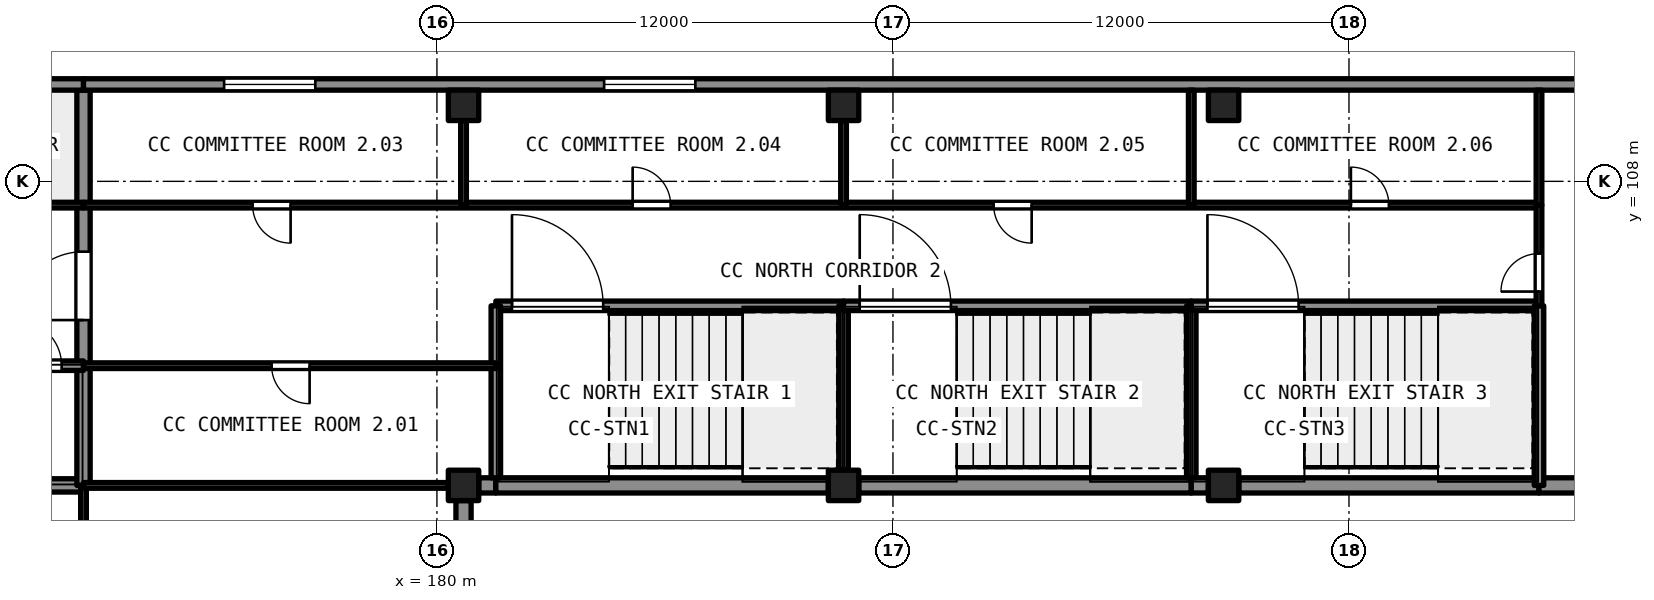
"""IFC4 building model, lengths in metres.
Left out: names, types, materials, properties, quantities, classifications, styles, units other than length and angle.
Written with IfcOpenShell. Run it as: python <this file> out.ifc"""

import sys

from ifc_helpers import new_model, si_unit, direction, frame, frame_2d, origin, origin_2d, place, context, subcontext, project, spatial, rectangle, extrude, element, fill, save


model = new_model("IFC4")
c1 = context("Model", 3, precision=1e-05, world=origin(), true_north=direction((0.0, 1.0)))
c2 = subcontext(c1, "Body", "Model", "MODEL_VIEW")
j1 = project(units=[si_unit("LENGTHUNIT", "METRE"), si_unit("PLANEANGLEUNIT", "RADIAN")], contexts=[c1])
p1 = place(None, origin())
s1 = spatial("IfcSite", under=j1, at=p1, CompositionType="ELEMENT")
p2 = place(p1, origin())
s2 = spatial("IfcBuilding", under=s1, at=p2, CompositionType="ELEMENT")
p3 = place(p2, frame((0.0, 0.0, 15.0)))
s3 = spatial("IfcBuildingStorey", under=s2, at=p3, CompositionType="ELEMENT", Elevation=15.0)
for number, where, z_axis, x_axis in (
    (1, (180.7, 100.0, 0.0), (0.0, 0.0, 1.0), (1.0, 0.0, 0.0)),
    (2, (180.7, 110.0, 0.0), (0.0, 0.0, 1.0), (1.0, 0.0, 0.0)),
    (3, (190.7, 100.0, 0.0), (0.0, 0.0, 1.0), (1.0, 0.0, 0.0)),
    (4, (190.7, 110.0, 0.0), (0.0, 0.0, 1.0), (1.0, 0.0, 0.0)),
    (5, (200.7, 100.0, 0.0), (0.0, 0.0, 1.0), (1.0, 0.0, 0.0)),
    (6, (200.7, 110.0, 0.0), (0.0, 0.0, 1.0), (1.0, 0.0, 0.0)),
):
    element("IfcColumn", number, at=place(p3, frame(where, z_axis=z_axis, x_axis=x_axis)), inside=s3, PredefinedType="COLUMN", context=c2, shape_type="SweptSolid", body=[
        extrude(rectangle(XDim=0.8, YDim=0.8, at=origin_2d()), origin(), (0.0, 0.0, 1.0), 5.4),
    ])
p4 = place(p3, frame((180.7, 60.4, 0.0), z_axis=(0.0, 0.0, 1.0), x_axis=(0.0, 1.0, 0.0)))
e7 = element("IfcWall", 7, at=p4, inside=s3, PredefinedType="SHEAR", context=c2, shape_type="SweptSolid", body=[
    extrude(rectangle(XDim=39.2, YDim=0.4, at=frame_2d((19.6, 0.0))), origin(), (0.0, 0.0, 1.0), 5.4),
])
p5 = place(p4, frame((8.3, 0.0, 0.0)))
e8 = element("IfcOpeningElement", 8, at=p5, cuts=e7, PredefinedType="OPENING", context=c2, shape_type="SweptSolid", body=[
    extrude(rectangle(XDim=2.4, YDim=2.4, at=frame_2d((1.2, 1.2))), frame((0.0, 0.21, 0.0), z_axis=(0.0, -1.0, 0.0), x_axis=(1.0, 0.0, 0.0)), (0.0, 0.0, 1.0), 0.421),
])
p6 = place(p4, frame((28.3, 0.0, 0.0)))
e9 = element("IfcOpeningElement", 9, at=p6, cuts=e7, PredefinedType="OPENING", context=c2, shape_type="SweptSolid", body=[
    extrude(rectangle(XDim=2.4, YDim=2.4, at=frame_2d((1.2, 1.2))), frame((0.0, 0.21, 0.0), z_axis=(0.0, -1.0, 0.0), x_axis=(1.0, 0.0, 0.0)), (0.0, 0.0, 1.0), 0.421),
])
p7 = place(p3, frame((181.1, 100.0, 0.0), z_axis=(0.0, 0.0, 1.0), x_axis=(1.0, 0.0, 0.0)))
e10 = element("IfcWall", 10, at=p7, inside=s3, PredefinedType="SHEAR", context=c2, shape_type="SweptSolid", body=[
    extrude(rectangle(XDim=0.45, YDim=0.4, at=frame_2d((0.225, 0.0))), origin(), (0.0, 0.0, 1.0), 5.4),
])
for number, where, z_axis, x_axis in (
    (11, (181.55, 100.0, 0.0), (0.0, 0.0, 1.0), (1.0, 0.0, 0.0)),
    (12, (191.1, 100.0, 0.0), (0.0, 0.0, 1.0), (1.0, 0.0, 0.0)),
):
    element("IfcWall", number, at=place(p3, frame(where, z_axis=z_axis, x_axis=x_axis)), inside=s3, PredefinedType="SHEAR", context=c2, shape_type="SweptSolid", body=[
        extrude(rectangle(XDim=8.75, YDim=0.4, at=frame_2d((4.375, 0.0))), origin(), (0.0, 0.0, 1.0), 5.4),
    ])
p8 = place(p3, frame((199.85, 100.0, 0.0), z_axis=(0.0, 0.0, 1.0), x_axis=(1.0, 0.0, 0.0)))
e13 = element("IfcWall", 13, at=p8, inside=s3, PredefinedType="SHEAR", context=c2, shape_type="SweptSolid", body=[
    extrude(rectangle(XDim=0.45, YDim=0.4, at=frame_2d((0.225, 0.0))), origin(), (0.0, 0.0, 1.0), 5.4),
])
p9 = place(p3, frame((201.1, 100.0, 0.0), z_axis=(0.0, 0.0, 1.0), x_axis=(1.0, 0.0, 0.0)))
e14 = element("IfcWall", 14, at=p9, inside=s3, PredefinedType="SHEAR", context=c2, shape_type="SweptSolid", body=[
    extrude(rectangle(XDim=7.9, YDim=0.4, at=frame_2d((3.95, 0.0))), origin(), (0.0, 0.0, 1.0), 5.4),
])
p10 = place(p3, frame((209.0, 100.0, 0.0), z_axis=(0.0, 0.0, 1.0), x_axis=(1.0, 0.0, 0.0)))
e15 = element("IfcWall", 15, at=p10, inside=s3, PredefinedType="SHEAR", context=c2, shape_type="SweptSolid", body=[
    extrude(rectangle(XDim=1.3, YDim=0.4, at=frame_2d((0.65, 0.0))), origin(), (0.0, 0.0, 1.0), 5.4),
])
p11 = place(p3, frame((163.0, 100.0, 0.0), z_axis=(0.0, 0.0, 1.0), x_axis=(1.0, 0.0, 0.0)))
e16 = element("IfcWall", 16, at=p11, inside=s3, PredefinedType="SHEAR", context=c2, shape_type="SweptSolid", body=[
    extrude(rectangle(XDim=7.7, YDim=0.35, at=frame_2d((3.85, 0.0))), origin(), (0.0, 0.0, 1.0), 4.99),
])
p12 = place(p3, frame((170.7, 100.0, 0.0), z_axis=(0.0, 0.0, 1.0), x_axis=(0.0, 1.0, 0.0)))
e17 = element("IfcWall", 17, at=p12, inside=s3, PredefinedType="SHEAR", context=c2, shape_type="SweptSolid", body=[
    extrude(rectangle(XDim=3.15, YDim=0.35, at=frame_2d((1.575, 0.0))), origin(), (0.0, 0.0, 1.0), 4.99),
])
p13 = place(p3, frame((170.7, 103.15, 0.0), z_axis=(0.0, 0.0, 1.0), x_axis=(0.0, 1.0, 0.0)))
e18 = element("IfcWall", 18, at=p13, inside=s3, PredefinedType="SHEAR", context=c2, shape_type="SweptSolid", body=[
    extrude(rectangle(XDim=7.25, YDim=0.35, at=frame_2d((3.625, 0.0))), origin(), (0.0, 0.0, 1.0), 4.99),
])
p14 = place(p13, frame((1.2, 0.0, 0.0)))
e19 = element("IfcOpeningElement", 19, at=p14, cuts=e18, PredefinedType="OPENING", context=c2, shape_type="SweptSolid", body=[
    extrude(rectangle(XDim=1.8, YDim=2.1, at=frame_2d((0.9, 1.05))), frame((0.0, 0.186, 0.0), z_axis=(0.0, -1.0, 0.0), x_axis=(1.0, 0.0, 0.0)), (0.0, 0.0, 1.0), 0.371),
])
p15 = place(p3, frame((163.0, 103.15, 0.0), z_axis=(0.0, 0.0, 1.0), x_axis=(1.0, 0.0, 0.0)))
e20 = element("IfcWall", 20, at=p15, inside=s3, PredefinedType="SHEAR", context=c2, shape_type="SweptSolid", body=[
    extrude(rectangle(XDim=7.7, YDim=0.25, at=frame_2d((3.85, 0.0))), origin(), (0.0, 0.0, 1.0), 4.99),
])
p16 = place(p15, frame((5.925, 0.0, 0.0)))
e21 = element("IfcOpeningElement", 21, at=p16, cuts=e20, PredefinedType="OPENING", context=c2, shape_type="SweptSolid", body=[
    extrude(rectangle(XDim=1.2, YDim=2.1, at=frame_2d((0.6, 1.05))), frame((0.0, 0.135, 0.0), z_axis=(0.0, -1.0, 0.0), x_axis=(1.0, 0.0, 0.0)), (0.0, 0.0, 1.0), 0.271),
])
p17 = place(p3, frame((163.875, 107.375, 0.0), z_axis=(0.0, 0.0, 1.0), x_axis=(1.0, 0.0, 0.0)))
e22 = element("IfcWall", 22, at=p17, inside=s3, PredefinedType="PARTITIONING", context=c2, shape_type="SweptSolid", body=[
    extrude(rectangle(XDim=6.825, YDim=0.15, at=frame_2d((3.413, 0.0))), origin(), (0.0, 0.0, 1.0), 4.99),
])
p18 = place(p17, frame((2.95, 0.0, 0.0)))
e23 = element("IfcOpeningElement", 23, at=p18, cuts=e22, PredefinedType="OPENING", context=c2, shape_type="SweptSolid", body=[
    extrude(rectangle(XDim=0.9, YDim=2.1, at=frame_2d((0.45, 1.05))), frame((0.0, 0.085, 0.0), z_axis=(0.0, -1.0, 0.0), x_axis=(1.0, 0.0, 0.0)), (0.0, 0.0, 1.0), 0.171),
])
p19 = place(p3, frame((163.875, 110.55, 0.0), z_axis=(0.0, 0.0, 1.0), x_axis=(1.0, 0.0, 0.0)))
e24 = element("IfcWall", 24, at=p19, inside=s3, PredefinedType="SOLIDWALL", context=c2, shape_type="SweptSolid", body=[
    extrude(rectangle(XDim=6.825, YDim=0.3, at=frame_2d((3.413, 0.0))), origin(), (0.0, 0.0, 1.0), 4.99),
])
p20 = place(p3, frame((170.7, 110.55, 0.0), z_axis=(0.0, 0.0, 1.0), x_axis=(1.0, 0.0, 0.0)))
e25 = element("IfcWall", 25, at=p20, inside=s3, PredefinedType="SOLIDWALL", context=c2, shape_type="SweptSolid", body=[
    extrude(rectangle(XDim=50.0, YDim=0.3, at=frame_2d((25.0, 0.0))), origin(), (0.0, 0.0, 1.0), 4.99),
])
p21 = place(p20, frame((3.7, 0.0, 0.9)))
e26 = element("IfcOpeningElement", 26, at=p21, cuts=e25, PredefinedType="OPENING", context=c2, shape_type="SweptSolid", body=[
    extrude(rectangle(XDim=2.4, YDim=1.8, at=frame_2d((1.2, 0.9))), frame((0.0, 0.161, 0.0), z_axis=(0.0, -1.0, 0.0), x_axis=(1.0, 0.0, 0.0)), (0.0, 0.0, 1.0), 0.321),
])
p22 = place(p20, frame((13.7, 0.0, 0.9)))
e27 = element("IfcOpeningElement", 27, at=p22, cuts=e25, PredefinedType="OPENING", context=c2, shape_type="SweptSolid", body=[
    extrude(rectangle(XDim=2.4, YDim=1.8, at=frame_2d((1.2, 0.9))), frame((0.0, 0.161, 0.0), z_axis=(0.0, -1.0, 0.0), x_axis=(1.0, 0.0, 0.0)), (0.0, 0.0, 1.0), 0.321),
])
p23 = place(p3, frame((170.7, 90.0, 0.0), z_axis=(0.0, 0.0, 1.0), x_axis=(0.0, 1.0, 0.0)))
e28 = element("IfcWall", 28, at=p23, inside=s3, PredefinedType="PARTITIONING", context=c2, shape_type="SweptSolid", body=[
    extrude(rectangle(XDim=10.0, YDim=0.15, at=frame_2d((5.0, 0.0))), origin(), (0.0, 0.0, 1.0), 4.99),
])
p24 = place(p3, frame((170.7, 100.0, 0.0), z_axis=(0.0, 0.0, 1.0), x_axis=(1.0, 0.0, 0.0)))
e29 = element("IfcWall", 29, at=p24, inside=s3, PredefinedType="PARTITIONING", context=c2, shape_type="SweptSolid", body=[
    extrude(rectangle(XDim=9.6, YDim=0.15, at=frame_2d((4.8, 0.0))), origin(), (0.0, 0.0, 1.0), 4.99),
])
p25 = place(p3, frame((181.55, 104.725, 0.0), z_axis=(0.0, 0.0, 1.0), x_axis=(1.0, 0.0, 0.0)))
e30 = element("IfcWall", 30, at=p25, inside=s3, PredefinedType="SHEAR", context=c2, shape_type="SweptSolid", body=[
    extrude(rectangle(XDim=9.15, YDim=0.25, at=frame_2d((4.575, 0.0))), origin(), (0.0, 0.0, 1.0), 4.99),
])
p26 = place(p25, frame((0.425, 0.0, 0.0)))
e31 = element("IfcOpeningElement", 31, at=p26, cuts=e30, PredefinedType="OPENING", context=c2, shape_type="SweptSolid", body=[
    extrude(rectangle(XDim=2.4, YDim=2.1, at=frame_2d((1.2, 1.05))), frame((0.0, 0.135, 0.0), z_axis=(0.0, -1.0, 0.0), x_axis=(1.0, 0.0, 0.0)), (0.0, 0.0, 1.0), 0.271),
])
p27 = place(p3, frame((181.55, 100.2, 0.0), z_axis=(0.0, 0.0, 1.0), x_axis=(0.0, 1.0, 0.0)))
e32 = element("IfcWall", 32, at=p27, inside=s3, PredefinedType="SHEAR", context=c2, shape_type="SweptSolid", body=[
    extrude(rectangle(XDim=4.525, YDim=0.25, at=frame_2d((2.263, 0.0))), origin(), (0.0, 0.0, 1.0), 4.99),
])
p28 = place(p3, frame((190.7, 100.4, 0.0), z_axis=(0.0, 0.0, 1.0), x_axis=(0.0, 1.0, 0.0)))
e33 = element("IfcWall", 33, at=p28, inside=s3, PredefinedType="SHEAR", context=c2, shape_type="SweptSolid", body=[
    extrude(rectangle(XDim=4.325, YDim=0.25, at=frame_2d((2.163, 0.0))), origin(), (0.0, 0.0, 1.0), 4.99),
])
p29 = place(p3, frame((190.7, 104.725, 0.0), z_axis=(0.0, 0.0, 1.0), x_axis=(1.0, 0.0, 0.0)))
e34 = element("IfcWall", 34, at=p29, inside=s3, PredefinedType="SHEAR", context=c2, shape_type="SweptSolid", body=[
    extrude(rectangle(XDim=9.15, YDim=0.25, at=frame_2d((4.575, 0.0))), origin(), (0.0, 0.0, 1.0), 4.99),
])
p30 = place(p29, frame((0.425, 0.0, 0.0)))
e35 = element("IfcOpeningElement", 35, at=p30, cuts=e34, PredefinedType="OPENING", context=c2, shape_type="SweptSolid", body=[
    extrude(rectangle(XDim=2.4, YDim=2.1, at=frame_2d((1.2, 1.05))), frame((0.0, 0.135, 0.0), z_axis=(0.0, -1.0, 0.0), x_axis=(1.0, 0.0, 0.0)), (0.0, 0.0, 1.0), 0.271),
])
p31 = place(p3, frame((199.85, 100.2, 0.0), z_axis=(0.0, 0.0, 1.0), x_axis=(0.0, 1.0, 0.0)))
e36 = element("IfcWall", 36, at=p31, inside=s3, PredefinedType="SHEAR", context=c2, shape_type="SweptSolid", body=[
    extrude(rectangle(XDim=4.525, YDim=0.25, at=frame_2d((2.263, 0.0))), origin(), (0.0, 0.0, 1.0), 4.99),
])
p32 = place(p3, frame((199.85, 104.725, 0.0), z_axis=(0.0, 0.0, 1.0), x_axis=(1.0, 0.0, 0.0)))
e37 = element("IfcWall", 37, at=p32, inside=s3, PredefinedType="SHEAR", context=c2, shape_type="SweptSolid", body=[
    extrude(rectangle(XDim=9.15, YDim=0.25, at=frame_2d((4.575, 0.0))), origin(), (0.0, 0.0, 1.0), 4.99),
])
p33 = place(p32, frame((0.425, 0.0, 0.0)))
e38 = element("IfcOpeningElement", 38, at=p33, cuts=e37, PredefinedType="OPENING", context=c2, shape_type="SweptSolid", body=[
    extrude(rectangle(XDim=2.4, YDim=2.1, at=frame_2d((1.2, 1.05))), frame((0.0, 0.135, 0.0), z_axis=(0.0, -1.0, 0.0), x_axis=(1.0, 0.0, 0.0)), (0.0, 0.0, 1.0), 0.271),
])
p34 = place(p3, frame((209.0, 100.0, 0.0), z_axis=(0.0, 0.0, 1.0), x_axis=(0.0, 1.0, 0.0)))
e39 = element("IfcWall", 39, at=p34, inside=s3, PredefinedType="SHEAR", context=c2, shape_type="SweptSolid", body=[
    extrude(rectangle(XDim=4.725, YDim=0.25, at=frame_2d((2.363, 0.0))), origin(), (0.0, 0.0, 1.0), 4.99),
])
p35 = place(p3, frame((170.7, 103.15, 0.0), z_axis=(0.0, 0.0, 1.0), x_axis=(1.0, 0.0, 0.0)))
e40 = element("IfcWall", 40, at=p35, inside=s3, PredefinedType="PARTITIONING", context=c2, shape_type="SweptSolid", body=[
    extrude(rectangle(XDim=10.85, YDim=0.15, at=frame_2d((5.425, 0.0))), origin(), (0.0, 0.0, 1.0), 4.99),
])
p36 = place(p35, frame((4.95, 0.0, 0.0)))
e41 = element("IfcOpeningElement", 41, at=p36, cuts=e40, PredefinedType="OPENING", context=c2, shape_type="SweptSolid", body=[
    extrude(rectangle(XDim=1.0, YDim=2.1, at=frame_2d((0.5, 1.05))), frame((0.0, 0.085, 0.0), z_axis=(0.0, -1.0, 0.0), x_axis=(1.0, 0.0, 0.0)), (0.0, 0.0, 1.0), 0.171),
])
p37 = place(p3, frame((209.0, 107.375, 0.0), z_axis=(0.0, 0.0, 1.0), x_axis=(-1.0, 0.0, 0.0)))
e42 = element("IfcWall", 42, at=p37, inside=s3, PredefinedType="PARTITIONING", context=c2, shape_type="SweptSolid", body=[
    extrude(rectangle(XDim=38.3, YDim=0.15, at=frame_2d((19.15, 0.0))), origin(), (0.0, 0.0, 1.0), 4.99),
])
p38 = place(p37, frame((32.85, 0.0, 0.0)))
e43 = element("IfcOpeningElement", 43, at=p38, cuts=e42, PredefinedType="OPENING", context=c2, shape_type="SweptSolid", body=[
    extrude(rectangle(XDim=1.0, YDim=2.1, at=frame_2d((0.5, 1.05))), frame((0.0, 0.085, 0.0), z_axis=(0.0, -1.0, 0.0), x_axis=(1.0, 0.0, 0.0)), (0.0, 0.0, 1.0), 0.171),
])
p39 = place(p37, frame((22.85, 0.0, 0.0)))
e44 = element("IfcOpeningElement", 44, at=p39, cuts=e42, PredefinedType="OPENING", context=c2, shape_type="SweptSolid", body=[
    extrude(rectangle(XDim=1.0, YDim=2.1, at=frame_2d((0.5, 1.05))), frame((0.0, 0.085, 0.0), z_axis=(0.0, -1.0, 0.0), x_axis=(1.0, 0.0, 0.0)), (0.0, 0.0, 1.0), 0.171),
])
p40 = place(p37, frame((13.35, 0.0, 0.0)))
e45 = element("IfcOpeningElement", 45, at=p40, cuts=e42, PredefinedType="OPENING", context=c2, shape_type="SweptSolid", body=[
    extrude(rectangle(XDim=1.0, YDim=2.1, at=frame_2d((0.5, 1.05))), frame((0.0, 0.085, 0.0), z_axis=(0.0, -1.0, 0.0), x_axis=(1.0, 0.0, 0.0)), (0.0, 0.0, 1.0), 0.171),
])
p41 = place(p37, frame((3.95, 0.0, 0.0)))
e46 = element("IfcOpeningElement", 46, at=p41, cuts=e42, PredefinedType="OPENING", context=c2, shape_type="SweptSolid", body=[
    extrude(rectangle(XDim=1.0, YDim=2.1, at=frame_2d((0.5, 1.05))), frame((0.0, 0.085, 0.0), z_axis=(0.0, -1.0, 0.0), x_axis=(1.0, 0.0, 0.0)), (0.0, 0.0, 1.0), 0.171),
])
p42 = place(p3, frame((209.0, 104.725, 0.0), z_axis=(0.0, 0.0, 1.0), x_axis=(0.0, 1.0, 0.0)))
e47 = element("IfcWall", 47, at=p42, inside=s3, PredefinedType="PARTITIONING", context=c2, shape_type="SweptSolid", body=[
    extrude(rectangle(XDim=2.65, YDim=0.15, at=frame_2d((1.325, 0.0))), origin(), (0.0, 0.0, 1.0), 4.99),
])
p43 = place(p42, frame((0.375, 0.0, 0.0)))
e48 = element("IfcOpeningElement", 48, at=p43, cuts=e47, PredefinedType="OPENING", context=c2, shape_type="SweptSolid", body=[
    extrude(rectangle(XDim=1.0, YDim=2.1, at=frame_2d((0.5, 1.05))), frame((0.0, 0.085, 0.0), z_axis=(0.0, -1.0, 0.0), x_axis=(1.0, 0.0, 0.0)), (0.0, 0.0, 1.0), 0.171),
])
for number, where, z_axis, x_axis in (
    (49, (180.7, 107.375, 0.0), (0.0, 0.0, 1.0), (0.0, 1.0, 0.0)),
    (50, (190.7, 107.375, 0.0), (0.0, 0.0, 1.0), (0.0, 1.0, 0.0)),
):
    element("IfcWall", number, at=place(p3, frame(where, z_axis=z_axis, x_axis=x_axis)), inside=s3, PredefinedType="PARTITIONING", context=c2, shape_type="SweptSolid", body=[
        extrude(rectangle(XDim=2.225, YDim=0.15, at=frame_2d((1.113, 0.0))), origin(), (0.0, 0.0, 1.0), 4.99),
    ])
for number, where, z_axis, x_axis in (
    (51, (199.85, 107.375, 0.0), (0.0, 0.0, 1.0), (0.0, 1.0, 0.0)),
    (52, (209.0, 107.375, 0.0), (0.0, 0.0, 1.0), (0.0, 1.0, 0.0)),
):
    element("IfcWall", number, at=place(p3, frame(where, z_axis=z_axis, x_axis=x_axis)), inside=s3, PredefinedType="PARTITIONING", context=c2, shape_type="SweptSolid", body=[
        extrude(rectangle(XDim=3.025, YDim=0.15, at=frame_2d((1.512, 0.0))), origin(), (0.0, 0.0, 1.0), 4.99),
    ])
p44 = place(p14, origin())
e53 = element("IfcDoor", 53, at=p44, inside=s3, OperationType="DOUBLE_DOOR_SINGLE_SWING", PredefinedType="DOOR", context=c2, shape_type="SweptSolid", body=[
    extrude(rectangle(XDim=1.8, YDim=2.1, at=frame_2d((0.9, 1.05))), frame((0.0, 0.025, 0.0), z_axis=(0.0, -1.0, 0.0), x_axis=(1.0, 0.0, 0.0)), (0.0, 0.0, 1.0), 0.05),
])
fill(e19, e53)
p45 = place(p36, origin())
e54 = element("IfcDoor", 54, at=p45, inside=s3, OperationType="SINGLE_SWING_RIGHT", PredefinedType="DOOR", context=c2, shape_type="SweptSolid", body=[
    extrude(rectangle(XDim=1.0, YDim=2.1, at=frame_2d((0.5, 1.05))), frame((0.0, 0.025, 0.0), z_axis=(0.0, -1.0, 0.0), x_axis=(1.0, 0.0, 0.0)), (0.0, 0.0, 1.0), 0.05),
])
fill(e41, e54)
p46 = place(p38, origin())
e55 = element("IfcDoor", 55, at=p46, inside=s3, OperationType="SINGLE_SWING_LEFT", PredefinedType="DOOR", context=c2, shape_type="SweptSolid", body=[
    extrude(rectangle(XDim=1.0, YDim=2.1, at=frame_2d((0.5, 1.05))), frame((0.0, 0.025, 0.0), z_axis=(0.0, -1.0, 0.0), x_axis=(1.0, 0.0, 0.0)), (0.0, 0.0, 1.0), 0.05),
])
fill(e43, e55)
p47 = place(p39, origin())
e56 = element("IfcDoor", 56, at=p47, inside=s3, OperationType="SINGLE_SWING_RIGHT", PredefinedType="DOOR", context=c2, shape_type="SweptSolid", body=[
    extrude(rectangle(XDim=1.0, YDim=2.1, at=frame_2d((0.5, 1.05))), frame((0.0, 0.025, 0.0), z_axis=(0.0, -1.0, 0.0), x_axis=(1.0, 0.0, 0.0)), (0.0, 0.0, 1.0), 0.05),
])
fill(e44, e56)
p48 = place(p40, origin())
e57 = element("IfcDoor", 57, at=p48, inside=s3, OperationType="SINGLE_SWING_LEFT", PredefinedType="DOOR", context=c2, shape_type="SweptSolid", body=[
    extrude(rectangle(XDim=1.0, YDim=2.1, at=frame_2d((0.5, 1.05))), frame((0.0, 0.025, 0.0), z_axis=(0.0, -1.0, 0.0), x_axis=(1.0, 0.0, 0.0)), (0.0, 0.0, 1.0), 0.05),
])
fill(e45, e57)
p49 = place(p41, origin())
e58 = element("IfcDoor", 58, at=p49, inside=s3, OperationType="SINGLE_SWING_RIGHT", PredefinedType="DOOR", context=c2, shape_type="SweptSolid", body=[
    extrude(rectangle(XDim=1.0, YDim=2.1, at=frame_2d((0.5, 1.05))), frame((0.0, 0.025, 0.0), z_axis=(0.0, -1.0, 0.0), x_axis=(1.0, 0.0, 0.0)), (0.0, 0.0, 1.0), 0.05),
])
fill(e46, e58)
p50 = place(p43, origin())
e59 = element("IfcDoor", 59, at=p50, inside=s3, OperationType="SINGLE_SWING_LEFT", PredefinedType="DOOR", context=c2, shape_type="SweptSolid", body=[
    extrude(rectangle(XDim=1.0, YDim=2.1, at=frame_2d((0.5, 1.05))), frame((0.0, 0.025, 0.0), z_axis=(0.0, -1.0, 0.0), x_axis=(1.0, 0.0, 0.0)), (0.0, 0.0, 1.0), 0.05),
])
fill(e48, e59)
p51 = place(p16, origin())
e60 = element("IfcDoor", 60, at=p51, inside=s3, OperationType="SINGLE_SWING_LEFT", PredefinedType="DOOR", context=c2, shape_type="SweptSolid", body=[
    extrude(rectangle(XDim=1.2, YDim=2.1, at=frame_2d((0.6, 1.05))), frame((0.0, 0.025, 0.0), z_axis=(0.0, -1.0, 0.0), x_axis=(1.0, 0.0, 0.0)), (0.0, 0.0, 1.0), 0.05),
])
fill(e21, e60)
p52 = place(p26, origin())
e61 = element("IfcDoor", 61, at=p52, inside=s3, OperationType="DOUBLE_DOOR_SINGLE_SWING", PredefinedType="DOOR", context=c2, shape_type="SweptSolid", body=[
    extrude(rectangle(XDim=2.4, YDim=2.1, at=frame_2d((1.2, 1.05))), frame((0.0, 0.025, 0.0), z_axis=(0.0, -1.0, 0.0), x_axis=(1.0, 0.0, 0.0)), (0.0, 0.0, 1.0), 0.05),
])
fill(e31, e61)
p53 = place(p30, origin())
e62 = element("IfcDoor", 62, at=p53, inside=s3, OperationType="DOUBLE_DOOR_SINGLE_SWING", PredefinedType="DOOR", context=c2, shape_type="SweptSolid", body=[
    extrude(rectangle(XDim=2.4, YDim=2.1, at=frame_2d((1.2, 1.05))), frame((0.0, 0.025, 0.0), z_axis=(0.0, -1.0, 0.0), x_axis=(1.0, 0.0, 0.0)), (0.0, 0.0, 1.0), 0.05),
])
fill(e35, e62)
p54 = place(p33, origin())
e63 = element("IfcDoor", 63, at=p54, inside=s3, OperationType="DOUBLE_DOOR_SINGLE_SWING", PredefinedType="DOOR", context=c2, shape_type="SweptSolid", body=[
    extrude(rectangle(XDim=2.4, YDim=2.1, at=frame_2d((1.2, 1.05))), frame((0.0, 0.025, 0.0), z_axis=(0.0, -1.0, 0.0), x_axis=(1.0, 0.0, 0.0)), (0.0, 0.0, 1.0), 0.05),
])
fill(e38, e63)
p55 = place(p21, origin())
e64 = element("IfcWindow", 64, at=p55, inside=s3, PartitioningType="DOUBLE_PANEL_VERTICAL", PredefinedType="WINDOW", context=c2, shape_type="SweptSolid", body=[
    extrude(rectangle(XDim=2.4, YDim=1.8, at=frame_2d((1.2, 0.9))), frame((0.0, 0.03, 0.0), z_axis=(0.0, -1.0, 0.0), x_axis=(1.0, 0.0, 0.0)), (0.0, 0.0, 1.0), 0.06),
])
fill(e26, e64)
p56 = place(p22, origin())
e65 = element("IfcWindow", 65, at=p56, inside=s3, PartitioningType="DOUBLE_PANEL_VERTICAL", PredefinedType="WINDOW", context=c2, shape_type="SweptSolid", body=[
    extrude(rectangle(XDim=2.4, YDim=1.8, at=frame_2d((1.2, 0.9))), frame((0.0, 0.03, 0.0), z_axis=(0.0, -1.0, 0.0), x_axis=(1.0, 0.0, 0.0)), (0.0, 0.0, 1.0), 0.06),
])
fill(e27, e65)
save(model, sys.argv[1])
